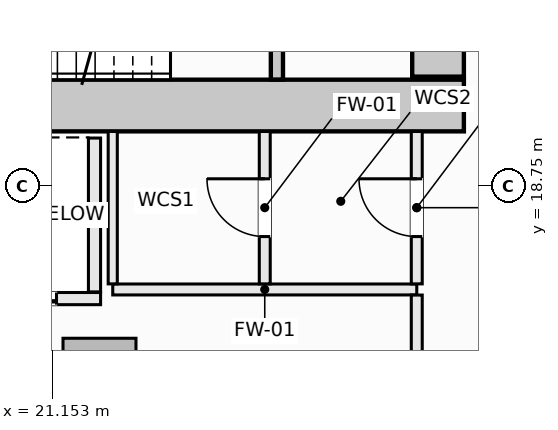
"""IFC4 building model, lengths in metres.
Left out: names, types, materials, properties, quantities, classifications, styles, units other than length and angle.
Written with IfcOpenShell. Run it as: python <this file> out.ifc"""

import sys

from ifc_helpers import new_model, si_unit, direction, frame, frame_2d, origin, origin_2d, place, context, subcontext, project, spatial, rectangle, extrude, element, fill, save


model = new_model("IFC4")
c1 = context("Model", 3, precision=1e-05, world=origin(), true_north=direction((0.0, 1.0)))
c2 = subcontext(c1, "Body", "Model", "MODEL_VIEW")
j1 = project(units=[si_unit("LENGTHUNIT", "METRE"), si_unit("PLANEANGLEUNIT", "RADIAN")], contexts=[c1])
p1 = place(None, origin())
s1 = spatial("IfcSite", under=j1, at=p1, CompositionType="ELEMENT")
p2 = place(p1, origin())
s2 = spatial("IfcBuilding", under=s1, at=p2, CompositionType="ELEMENT")
p3 = place(p2, frame((0.0, 0.0, 49.6)))
s3 = spatial("IfcBuildingStorey", under=s2, at=p3, CompositionType="ELEMENT", Elevation=49.6)
p4 = place(p3, frame((14.075, 20.075, -0.28), z_axis=(0.0, 0.0, 1.0), x_axis=(1.0, 0.0, 0.0)))
e1 = element("IfcWall", 1, at=p4, inside=s3, PredefinedType="SHEAR", context=c2, shape_type="SweptSolid", body=[
    extrude(rectangle(XDim=13.85, YDim=0.85, at=frame_2d((6.925, 0.0))), origin(), (0.0, 0.0, 1.0), 3.85),
])
p5 = place(p3, frame((27.5, 20.55, -0.28), z_axis=(0.0, 0.0, 1.0), x_axis=(0.0, 1.0, 0.0)))
e2 = element("IfcWall", 2, at=p5, inside=s3, PredefinedType="SHEAR", context=c2, shape_type="SweptSolid", body=[
    extrude(rectangle(XDim=1.5, YDim=0.85, at=frame_2d((0.75, 0.0))), origin(), (0.0, 0.0, 1.0), 3.85),
])
p6 = place(p3, frame((21.932, 15.648, -0.28), z_axis=(0.0, 0.0, 1.0), x_axis=(1.0, 0.0, 0.0)))
e3 = element("IfcColumn", 3, at=p6, inside=s3, PredefinedType="COLUMN", context=c2, shape_type="SweptSolid", body=[
    extrude(rectangle(XDim=1.2, YDim=1.2, at=origin_2d()), origin(), (0.0, 0.0, 1.0), 3.85),
])
p7 = place(p3, frame((24.85, 20.502, -0.28), z_axis=(0.0, 0.0, 1.0), x_axis=(0.0, 1.0, 0.0)))
e4 = element("IfcWall", 4, at=p7, inside=s3, PredefinedType="SHEAR", context=c2, shape_type="SweptSolid", body=[
    extrude(rectangle(XDim=3.038, YDim=0.2, at=frame_2d((1.519, 0.0))), origin(), (0.0, 0.0, 1.0), 3.85),
])
p8 = place(p7, frame((0.969, 0.0, 0.28)))
e5 = element("IfcOpeningElement", 5, at=p8, cuts=e4, PredefinedType="OPENING", context=c2, shape_type="SweptSolid", body=[
    extrude(rectangle(XDim=1.1, YDim=2.15, at=frame_2d((0.55, 1.075))), frame((0.0, 0.11, 0.0), z_axis=(0.0, -1.0, 0.0), x_axis=(1.0, 0.0, 0.0)), (0.0, 0.0, 1.0), 0.22),
])
p9 = place(p3, frame((19.4, 16.9, 0.0), z_axis=(0.0, 0.0, 1.0), x_axis=(1.0, 0.0, 0.0)))
e6 = element("IfcWall", 6, at=p9, inside=s3, PredefinedType="SOLIDWALL", context=c2, shape_type="SweptSolid", body=[
    extrude(rectangle(XDim=2.55, YDim=0.2, at=frame_2d((1.275, 0.0))), origin(), (0.0, 0.0, 1.0), 3.57),
])
p10 = place(p9, frame((0.725, 0.0, 0.0)))
e7 = element("IfcOpeningElement", 7, at=p10, cuts=e6, PredefinedType="OPENING", context=c2, shape_type="SweptSolid", body=[
    extrude(rectangle(XDim=1.1, YDim=2.2, at=frame_2d((0.55, 1.1))), frame((0.0, 0.11, 0.0), z_axis=(0.0, -1.0, 0.0), x_axis=(1.0, 0.0, 0.0)), (0.0, 0.0, 1.0), 0.22),
])
p11 = place(p3, frame((21.85, 17.01, 0.0), z_axis=(0.0, 0.0, 1.0), x_axis=(0.0, 1.0, 0.0)))
e8 = element("IfcWall", 8, at=p11, inside=s3, PredefinedType="SOLIDWALL", context=c2, shape_type="SweptSolid", body=[
    extrude(rectangle(XDim=2.53, YDim=0.2, at=frame_2d((1.265, 0.0))), origin(), (0.0, 0.0, 1.0), 3.57),
])
p12 = place(p3, frame((22.15, 17.05, 0.0), z_axis=(0.0, 0.0, 1.0), x_axis=(1.0, 0.0, 0.0)))
e9 = element("IfcWall", 9, at=p12, inside=s3, PredefinedType="SOLIDWALL", context=c2, shape_type="SweptSolid", body=[
    extrude(rectangle(XDim=5.0, YDim=0.18, at=frame_2d((2.5, 0.0))), origin(), (0.0, 0.0, 1.0), 3.57),
])
p13 = place(p3, frame((22.15, 17.142, 0.0), z_axis=(0.0, 0.0, 1.0), x_axis=(0.0, 1.0, 0.0)))
e10 = element("IfcWall", 10, at=p13, inside=s3, PredefinedType="PARTITIONING", context=c2, shape_type="SweptSolid", body=[
    extrude(rectangle(XDim=2.506, YDim=0.15, at=frame_2d((1.253, 0.0))), origin(), (0.0, 0.0, 1.0), 3.57),
])
p14 = place(p3, frame((24.65, 17.142, 0.0), z_axis=(0.0, 0.0, 1.0), x_axis=(0.0, 1.0, 0.0)))
e11 = element("IfcWall", 11, at=p14, inside=s3, PredefinedType="SOLIDWALL", context=c2, shape_type="SweptSolid", body=[
    extrude(rectangle(XDim=2.506, YDim=0.18, at=frame_2d((1.253, 0.0))), origin(), (0.0, 0.0, 1.0), 3.57),
])
p15 = place(p14, frame((0.778, 0.0, 0.0)))
e12 = element("IfcOpeningElement", 12, at=p15, cuts=e11, PredefinedType="OPENING", context=c2, shape_type="SweptSolid", body=[
    extrude(rectangle(XDim=0.95, YDim=2.1, at=frame_2d((0.475, 1.05))), frame((0.0, 0.1, 0.0), z_axis=(0.0, -1.0, 0.0), x_axis=(1.0, 0.0, 0.0)), (0.0, 0.0, 1.0), 0.2),
])
p16 = place(p3, frame((27.15, 11.75, 0.0), z_axis=(0.0, 0.0, 1.0), x_axis=(0.0, 1.0, 0.0)))
e13 = element("IfcWall", 13, at=p16, inside=s3, PredefinedType="SOLIDWALL", context=c2, shape_type="SweptSolid", body=[
    extrude(rectangle(XDim=5.208, YDim=0.18, at=frame_2d((2.604, 0.0))), origin(), (0.0, 0.0, 1.0), 3.57),
])
p17 = place(p16, frame((2.983, 0.0, 0.0)))
e14 = element("IfcOpeningElement", 14, at=p17, cuts=e13, PredefinedType="OPENING", context=c2, shape_type="SweptSolid", body=[
    extrude(rectangle(XDim=0.95, YDim=2.1, at=frame_2d((0.475, 1.05))), frame((0.0, 0.1, 0.0), z_axis=(0.0, -1.0, 0.0), x_axis=(1.0, 0.0, 0.0)), (0.0, 0.0, 1.0), 0.2),
])
p18 = place(p3, frame((27.15, 17.142, 0.0), z_axis=(0.0, 0.0, 1.0), x_axis=(0.0, 1.0, 0.0)))
e15 = element("IfcWall", 15, at=p18, inside=s3, PredefinedType="SOLIDWALL", context=c2, shape_type="SweptSolid", body=[
    extrude(rectangle(XDim=2.506, YDim=0.18, at=frame_2d((1.253, 0.0))), origin(), (0.0, 0.0, 1.0), 3.57),
])
p19 = place(p18, frame((0.778, 0.0, 0.0)))
e16 = element("IfcOpeningElement", 16, at=p19, cuts=e15, PredefinedType="OPENING", context=c2, shape_type="SweptSolid", body=[
    extrude(rectangle(XDim=0.95, YDim=2.1, at=frame_2d((0.475, 1.05))), frame((0.0, 0.1, 0.0), z_axis=(0.0, -1.0, 0.0), x_axis=(1.0, 0.0, 0.0)), (0.0, 0.0, 1.0), 0.2),
])
p20 = place(p10, origin())
e17 = element("IfcDoor", 17, at=p20, inside=s3, OperationType="SLIDING_TO_LEFT", PredefinedType="DOOR", context=c2, shape_type="SweptSolid", body=[
    extrude(rectangle(XDim=1.1, YDim=2.2, at=frame_2d((0.55, 1.1))), frame((0.0, 0.025, 0.0), z_axis=(0.0, -1.0, 0.0), x_axis=(1.0, 0.0, 0.0)), (0.0, 0.0, 1.0), 0.05),
])
fill(e7, e17)
p21 = place(p19, origin())
e18 = element("IfcDoor", 18, at=p21, inside=s3, OperationType="SINGLE_SWING_RIGHT", PredefinedType="DOOR", context=c2, shape_type="SweptSolid", body=[
    extrude(rectangle(XDim=0.95, YDim=2.1, at=frame_2d((0.475, 1.05))), frame((0.0, 0.025, 0.0), z_axis=(0.0, -1.0, 0.0), x_axis=(1.0, 0.0, 0.0)), (0.0, 0.0, 1.0), 0.05),
])
fill(e16, e18)
p22 = place(p15, origin())
e19 = element("IfcDoor", 19, at=p22, inside=s3, OperationType="SINGLE_SWING_RIGHT", PredefinedType="DOOR", context=c2, shape_type="SweptSolid", body=[
    extrude(rectangle(XDim=0.95, YDim=2.1, at=frame_2d((0.475, 1.05))), frame((0.0, 0.025, 0.0), z_axis=(0.0, -1.0, 0.0), x_axis=(1.0, 0.0, 0.0)), (0.0, 0.0, 1.0), 0.05),
])
fill(e12, e19)
save(model, sys.argv[1])
